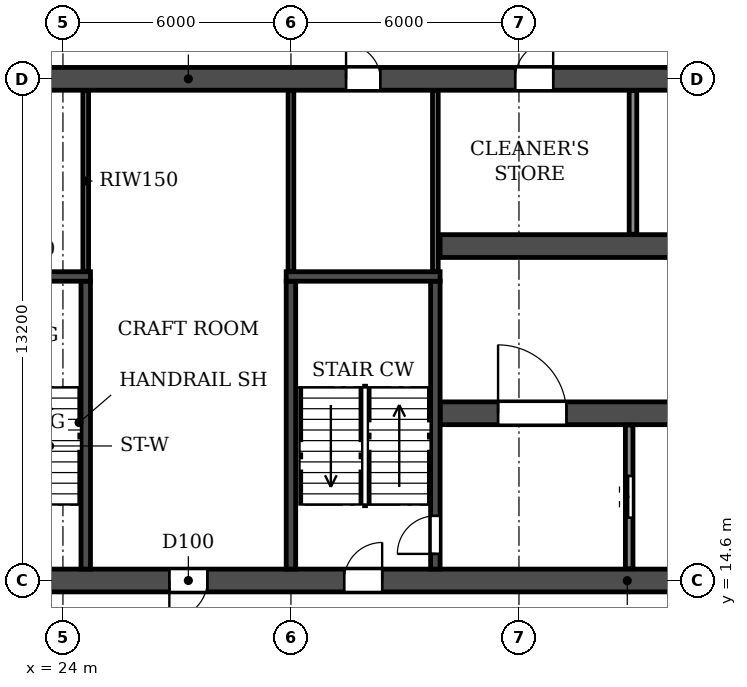
"""IFC4 building model, lengths in metres.
Left out: names, types, materials, properties, quantities, classifications, styles, units other than length and angle.
Written with IfcOpenShell. Run it as: python <this file> out.ifc"""

import sys

from ifc_helpers import new_model, si_unit, direction, frame, frame_2d, origin, place, context, subcontext, project, spatial, rectangle, extrude, element, fill, save


model = new_model("IFC4")
c1 = context("Model", 3, precision=1e-05, world=origin(), true_north=direction((0.0, 1.0)))
c2 = subcontext(c1, "Body", "Model", "MODEL_VIEW")
j1 = project(units=[si_unit("LENGTHUNIT", "METRE"), si_unit("PLANEANGLEUNIT", "RADIAN")], contexts=[c1])
p1 = place(None, origin())
s1 = spatial("IfcSite", under=j1, at=p1, CompositionType="ELEMENT")
p2 = place(p1, origin())
s2 = spatial("IfcBuilding", under=s1, at=p2, CompositionType="ELEMENT")
p3 = place(p2, frame((0.0, 0.0, 43.2)))
s3 = spatial("IfcBuildingStorey", under=s2, at=p3, CompositionType="ELEMENT", Elevation=43.2)
p4 = place(p3, frame((2.6, 14.6, 0.0), z_axis=(0.0, 0.0, 1.0), x_axis=(1.0, 0.0, 0.0)))
e1 = element("IfcWall", 1, at=p4, inside=s3, PredefinedType="SOLIDWALL", context=c2, shape_type="SweptSolid", body=[
    extrude(rectangle(XDim=96.8, YDim=0.6, at=frame_2d((48.4, 0.0))), origin(), (0.0, 0.0, 1.0), 3.05),
])
p5 = place(p4, frame((3.05, 0.0, 0.0)))
e2 = element("IfcOpeningElement", 2, at=p5, cuts=e1, PredefinedType="OPENING", context=c2, shape_type="SweptSolid", body=[
    extrude(rectangle(XDim=1.5, YDim=2.1, at=frame_2d((0.75, 1.05))), frame((0.0, 0.31, 0.0), z_axis=(0.0, -1.0, 0.0), x_axis=(1.0, 0.0, 0.0)), (0.0, 0.0, 1.0), 0.62),
])
p6 = place(p4, frame((10.75, 0.0, 0.0)))
e3 = element("IfcOpeningElement", 3, at=p6, cuts=e1, PredefinedType="OPENING", context=c2, shape_type="SweptSolid", body=[
    extrude(rectangle(XDim=1.5, YDim=2.1, at=frame_2d((0.75, 1.05))), frame((0.0, 0.31, 0.0), z_axis=(0.0, -1.0, 0.0), x_axis=(1.0, 0.0, 0.0)), (0.0, 0.0, 1.0), 0.62),
])
p7 = place(p4, frame((16.3, 0.0, 0.0)))
e4 = element("IfcOpeningElement", 4, at=p7, cuts=e1, PredefinedType="OPENING", context=c2, shape_type="SweptSolid", body=[
    extrude(rectangle(XDim=1.0, YDim=2.1, at=frame_2d((0.5, 1.05))), frame((0.0, 0.31, 0.0), z_axis=(0.0, -1.0, 0.0), x_axis=(1.0, 0.0, 0.0)), (0.0, 0.0, 1.0), 0.62),
])
p8 = place(p4, frame((24.2, 0.0, 0.0)))
e5 = element("IfcOpeningElement", 5, at=p8, cuts=e1, PredefinedType="OPENING", context=c2, shape_type="SweptSolid", body=[
    extrude(rectangle(XDim=1.0, YDim=2.1, at=frame_2d((0.5, 1.05))), frame((0.0, 0.31, 0.0), z_axis=(0.0, -1.0, 0.0), x_axis=(1.0, 0.0, 0.0)), (0.0, 0.0, 1.0), 0.62),
])
p9 = place(p4, frame((28.8, 0.0, 0.0)))
e6 = element("IfcOpeningElement", 6, at=p9, cuts=e1, PredefinedType="OPENING", context=c2, shape_type="SweptSolid", body=[
    extrude(rectangle(XDim=1.0, YDim=2.1, at=frame_2d((0.5, 1.05))), frame((0.0, 0.31, 0.0), z_axis=(0.0, -1.0, 0.0), x_axis=(1.0, 0.0, 0.0)), (0.0, 0.0, 1.0), 0.62),
])
p10 = place(p4, frame((42.7, 0.0, 0.0)))
e7 = element("IfcOpeningElement", 7, at=p10, cuts=e1, PredefinedType="OPENING", context=c2, shape_type="SweptSolid", body=[
    extrude(rectangle(XDim=1.0, YDim=2.1, at=frame_2d((0.5, 1.05))), frame((0.0, 0.31, 0.0), z_axis=(0.0, -1.0, 0.0), x_axis=(1.0, 0.0, 0.0)), (0.0, 0.0, 1.0), 0.62),
])
p11 = place(p4, frame((47.9, 0.0, 0.0)))
e8 = element("IfcOpeningElement", 8, at=p11, cuts=e1, PredefinedType="OPENING", context=c2, shape_type="SweptSolid", body=[
    extrude(rectangle(XDim=1.0, YDim=2.1, at=frame_2d((0.5, 1.05))), frame((0.0, 0.31, 0.0), z_axis=(0.0, -1.0, 0.0), x_axis=(1.0, 0.0, 0.0)), (0.0, 0.0, 1.0), 0.62),
])
p12 = place(p4, frame((51.8, 0.0, 0.0)))
e9 = element("IfcOpeningElement", 9, at=p12, cuts=e1, PredefinedType="OPENING", context=c2, shape_type="SweptSolid", body=[
    extrude(rectangle(XDim=1.0, YDim=2.1, at=frame_2d((0.5, 1.05))), frame((0.0, 0.31, 0.0), z_axis=(0.0, -1.0, 0.0), x_axis=(1.0, 0.0, 0.0)), (0.0, 0.0, 1.0), 0.62),
])
p13 = place(p4, frame((55.7, 0.0, 0.0)))
e10 = element("IfcOpeningElement", 10, at=p13, cuts=e1, PredefinedType="OPENING", context=c2, shape_type="SweptSolid", body=[
    extrude(rectangle(XDim=1.0, YDim=2.1, at=frame_2d((0.5, 1.05))), frame((0.0, 0.31, 0.0), z_axis=(0.0, -1.0, 0.0), x_axis=(1.0, 0.0, 0.0)), (0.0, 0.0, 1.0), 0.62),
])
p14 = place(p4, frame((67.0, 0.0, 0.0)))
e11 = element("IfcOpeningElement", 11, at=p14, cuts=e1, PredefinedType="OPENING", context=c2, shape_type="SweptSolid", body=[
    extrude(rectangle(XDim=1.0, YDim=2.1, at=frame_2d((0.5, 1.05))), frame((0.0, 0.31, 0.0), z_axis=(0.0, -1.0, 0.0), x_axis=(1.0, 0.0, 0.0)), (0.0, 0.0, 1.0), 0.62),
])
p15 = place(p4, frame((71.6, 0.0, 0.0)))
e12 = element("IfcOpeningElement", 12, at=p15, cuts=e1, PredefinedType="OPENING", context=c2, shape_type="SweptSolid", body=[
    extrude(rectangle(XDim=1.0, YDim=2.1, at=frame_2d((0.5, 1.05))), frame((0.0, 0.31, 0.0), z_axis=(0.0, -1.0, 0.0), x_axis=(1.0, 0.0, 0.0)), (0.0, 0.0, 1.0), 0.62),
])
p16 = place(p4, frame((79.5, 0.0, 0.0)))
e13 = element("IfcOpeningElement", 13, at=p16, cuts=e1, PredefinedType="OPENING", context=c2, shape_type="SweptSolid", body=[
    extrude(rectangle(XDim=1.0, YDim=2.1, at=frame_2d((0.5, 1.05))), frame((0.0, 0.31, 0.0), z_axis=(0.0, -1.0, 0.0), x_axis=(1.0, 0.0, 0.0)), (0.0, 0.0, 1.0), 0.62),
])
p17 = place(p4, frame((84.05, 0.0, 0.0)))
e14 = element("IfcOpeningElement", 14, at=p17, cuts=e1, PredefinedType="OPENING", context=c2, shape_type="SweptSolid", body=[
    extrude(rectangle(XDim=1.0, YDim=2.1, at=frame_2d((0.5, 1.05))), frame((0.0, 0.31, 0.0), z_axis=(0.0, -1.0, 0.0), x_axis=(1.0, 0.0, 0.0)), (0.0, 0.0, 1.0), 0.62),
])
p18 = place(p4, frame((91.75, 0.0, 0.0)))
e15 = element("IfcOpeningElement", 15, at=p18, cuts=e1, PredefinedType="OPENING", context=c2, shape_type="SweptSolid", body=[
    extrude(rectangle(XDim=1.0, YDim=2.1, at=frame_2d((0.5, 1.05))), frame((0.0, 0.31, 0.0), z_axis=(0.0, -1.0, 0.0), x_axis=(1.0, 0.0, 0.0)), (0.0, 0.0, 1.0), 0.62),
])
p19 = place(p3, frame((2.6, 27.8, 0.0), z_axis=(0.0, 0.0, 1.0), x_axis=(1.0, 0.0, 0.0)))
e16 = element("IfcWall", 16, at=p19, inside=s3, PredefinedType="SOLIDWALL", context=c2, shape_type="SweptSolid", body=[
    extrude(rectangle(XDim=96.8, YDim=0.6, at=frame_2d((48.4, 0.0))), origin(), (0.0, 0.0, 1.0), 3.05),
])
p20 = place(p19, frame((7.2, 0.0, 0.0)))
e17 = element("IfcOpeningElement", 17, at=p20, cuts=e16, PredefinedType="OPENING", context=c2, shape_type="SweptSolid", body=[
    extrude(rectangle(XDim=1.0, YDim=2.1, at=frame_2d((0.5, 1.05))), frame((0.0, 0.31, 0.0), z_axis=(0.0, -1.0, 0.0), x_axis=(1.0, 0.0, 0.0)), (0.0, 0.0, 1.0), 0.62),
])
p21 = place(p19, frame((16.3, 0.0, 0.0)))
e18 = element("IfcOpeningElement", 18, at=p21, cuts=e16, PredefinedType="OPENING", context=c2, shape_type="SweptSolid", body=[
    extrude(rectangle(XDim=1.0, YDim=2.1, at=frame_2d((0.5, 1.05))), frame((0.0, 0.31, 0.0), z_axis=(0.0, -1.0, 0.0), x_axis=(1.0, 0.0, 0.0)), (0.0, 0.0, 1.0), 0.62),
])
p22 = place(p19, frame((19.65, 0.0, 0.0)))
e19 = element("IfcOpeningElement", 19, at=p22, cuts=e16, PredefinedType="OPENING", context=c2, shape_type="SweptSolid", body=[
    extrude(rectangle(XDim=0.9, YDim=2.1, at=frame_2d((0.45, 1.05))), frame((0.0, 0.31, 0.0), z_axis=(0.0, -1.0, 0.0), x_axis=(1.0, 0.0, 0.0)), (0.0, 0.0, 1.0), 0.62),
])
p23 = place(p19, frame((28.85, 0.0, 0.0)))
e20 = element("IfcOpeningElement", 20, at=p23, cuts=e16, PredefinedType="OPENING", context=c2, shape_type="SweptSolid", body=[
    extrude(rectangle(XDim=0.9, YDim=2.1, at=frame_2d((0.45, 1.05))), frame((0.0, 0.31, 0.0), z_axis=(0.0, -1.0, 0.0), x_axis=(1.0, 0.0, 0.0)), (0.0, 0.0, 1.0), 0.62),
])
p24 = place(p19, frame((33.3, 0.0, 0.0)))
e21 = element("IfcOpeningElement", 21, at=p24, cuts=e16, PredefinedType="OPENING", context=c2, shape_type="SweptSolid", body=[
    extrude(rectangle(XDim=1.0, YDim=2.1, at=frame_2d((0.5, 1.05))), frame((0.0, 0.31, 0.0), z_axis=(0.0, -1.0, 0.0), x_axis=(1.0, 0.0, 0.0)), (0.0, 0.0, 1.0), 0.62),
])
p25 = place(p19, frame((38.25, 0.0, 0.0)))
e22 = element("IfcOpeningElement", 22, at=p25, cuts=e16, PredefinedType="OPENING", context=c2, shape_type="SweptSolid", body=[
    extrude(rectangle(XDim=1.5, YDim=2.1, at=frame_2d((0.75, 1.05))), frame((0.0, 0.31, 0.0), z_axis=(0.0, -1.0, 0.0), x_axis=(1.0, 0.0, 0.0)), (0.0, 0.0, 1.0), 0.62),
])
p26 = place(p19, frame((45.0, 0.0, 0.0)))
e23 = element("IfcOpeningElement", 23, at=p26, cuts=e16, PredefinedType="OPENING", context=c2, shape_type="SweptSolid", body=[
    extrude(rectangle(XDim=1.0, YDim=2.1, at=frame_2d((0.5, 1.05))), frame((0.0, 0.31, 0.0), z_axis=(0.0, -1.0, 0.0), x_axis=(1.0, 0.0, 0.0)), (0.0, 0.0, 1.0), 0.62),
])
p27 = place(p19, frame((47.9, 0.0, 0.0)))
e24 = element("IfcOpeningElement", 24, at=p27, cuts=e16, PredefinedType="OPENING", context=c2, shape_type="SweptSolid", body=[
    extrude(rectangle(XDim=1.0, YDim=2.1, at=frame_2d((0.5, 1.05))), frame((0.0, 0.31, 0.0), z_axis=(0.0, -1.0, 0.0), x_axis=(1.0, 0.0, 0.0)), (0.0, 0.0, 1.0), 0.62),
])
p28 = place(p19, frame((52.1, 0.0, 0.0)))
e25 = element("IfcOpeningElement", 25, at=p28, cuts=e16, PredefinedType="OPENING", context=c2, shape_type="SweptSolid", body=[
    extrude(rectangle(XDim=1.0, YDim=2.1, at=frame_2d((0.5, 1.05))), frame((0.0, 0.31, 0.0), z_axis=(0.0, -1.0, 0.0), x_axis=(1.0, 0.0, 0.0)), (0.0, 0.0, 1.0), 0.62),
])
p29 = place(p19, frame((56.0, 0.0, 0.0)))
e26 = element("IfcOpeningElement", 26, at=p29, cuts=e16, PredefinedType="OPENING", context=c2, shape_type="SweptSolid", body=[
    extrude(rectangle(XDim=1.0, YDim=2.1, at=frame_2d((0.5, 1.05))), frame((0.0, 0.31, 0.0), z_axis=(0.0, -1.0, 0.0), x_axis=(1.0, 0.0, 0.0)), (0.0, 0.0, 1.0), 0.62),
])
p30 = place(p19, frame((61.2, 0.0, 0.0)))
e27 = element("IfcOpeningElement", 27, at=p30, cuts=e16, PredefinedType="OPENING", context=c2, shape_type="SweptSolid", body=[
    extrude(rectangle(XDim=1.0, YDim=2.1, at=frame_2d((0.5, 1.05))), frame((0.0, 0.31, 0.0), z_axis=(0.0, -1.0, 0.0), x_axis=(1.0, 0.0, 0.0)), (0.0, 0.0, 1.0), 0.62),
])
p31 = place(p19, frame((67.05, 0.0, 0.0)))
e28 = element("IfcOpeningElement", 28, at=p31, cuts=e16, PredefinedType="OPENING", context=c2, shape_type="SweptSolid", body=[
    extrude(rectangle(XDim=0.9, YDim=2.1, at=frame_2d((0.45, 1.05))), frame((0.0, 0.31, 0.0), z_axis=(0.0, -1.0, 0.0), x_axis=(1.0, 0.0, 0.0)), (0.0, 0.0, 1.0), 0.62),
])
p32 = place(p19, frame((76.25, 0.0, 0.0)))
e29 = element("IfcOpeningElement", 29, at=p32, cuts=e16, PredefinedType="OPENING", context=c2, shape_type="SweptSolid", body=[
    extrude(rectangle(XDim=0.9, YDim=2.1, at=frame_2d((0.45, 1.05))), frame((0.0, 0.31, 0.0), z_axis=(0.0, -1.0, 0.0), x_axis=(1.0, 0.0, 0.0)), (0.0, 0.0, 1.0), 0.62),
])
p33 = place(p19, frame((79.5, 0.0, 0.0)))
e30 = element("IfcOpeningElement", 30, at=p33, cuts=e16, PredefinedType="OPENING", context=c2, shape_type="SweptSolid", body=[
    extrude(rectangle(XDim=1.0, YDim=2.1, at=frame_2d((0.5, 1.05))), frame((0.0, 0.31, 0.0), z_axis=(0.0, -1.0, 0.0), x_axis=(1.0, 0.0, 0.0)), (0.0, 0.0, 1.0), 0.62),
])
p34 = place(p19, frame((84.05, 0.0, 0.0)))
e31 = element("IfcOpeningElement", 31, at=p34, cuts=e16, PredefinedType="OPENING", context=c2, shape_type="SweptSolid", body=[
    extrude(rectangle(XDim=1.0, YDim=2.1, at=frame_2d((0.5, 1.05))), frame((0.0, 0.31, 0.0), z_axis=(0.0, -1.0, 0.0), x_axis=(1.0, 0.0, 0.0)), (0.0, 0.0, 1.0), 0.62),
])
p35 = place(p19, frame((91.75, 0.0, 0.0)))
e32 = element("IfcOpeningElement", 32, at=p35, cuts=e16, PredefinedType="OPENING", context=c2, shape_type="SweptSolid", body=[
    extrude(rectangle(XDim=1.0, YDim=2.1, at=frame_2d((0.5, 1.05))), frame((0.0, 0.31, 0.0), z_axis=(0.0, -1.0, 0.0), x_axis=(1.0, 0.0, 0.0)), (0.0, 0.0, 1.0), 0.62),
])
p36 = place(p3, frame((33.925, 19.0, 0.0), z_axis=(0.0, 0.0, 1.0), x_axis=(1.0, 0.0, 0.0)))
e33 = element("IfcWall", 33, at=p36, inside=s3, PredefinedType="SOLIDWALL", context=c2, shape_type="SweptSolid", body=[
    extrude(rectangle(XDim=34.15, YDim=0.6, at=frame_2d((17.075, 0.0))), origin(), (0.0, 0.0, 1.0), 3.05),
])
p37 = place(p36, frame((16.175, 0.0, 0.0)))
e34 = element("IfcOpeningElement", 34, at=p37, cuts=e33, PredefinedType="OPENING", context=c2, shape_type="SweptSolid", body=[
    extrude(rectangle(XDim=1.8, YDim=2.1, at=frame_2d((0.9, 1.05))), frame((0.0, 0.31, 0.0), z_axis=(0.0, -1.0, 0.0), x_axis=(1.0, 0.0, 0.0)), (0.0, 0.0, 1.0), 0.62),
])
p38 = place(p36, frame((1.525, 0.0, 0.0)))
e35 = element("IfcOpeningElement", 35, at=p38, cuts=e33, PredefinedType="OPENING", context=c2, shape_type="SweptSolid", body=[
    extrude(rectangle(XDim=1.8, YDim=2.1, at=frame_2d((0.9, 1.05))), frame((0.0, 0.31, 0.0), z_axis=(0.0, -1.0, 0.0), x_axis=(1.0, 0.0, 0.0)), (0.0, 0.0, 1.0), 0.62),
])
p39 = place(p36, frame((8.725, 0.0, 0.0)))
e36 = element("IfcOpeningElement", 36, at=p39, cuts=e33, PredefinedType="OPENING", context=c2, shape_type="SweptSolid", body=[
    extrude(rectangle(XDim=1.1, YDim=2.1, at=frame_2d((0.55, 1.05))), frame((0.0, 0.31, 0.0), z_axis=(0.0, -1.0, 0.0), x_axis=(1.0, 0.0, 0.0)), (0.0, 0.0, 1.0), 0.62),
])
p40 = place(p36, frame((11.325, 0.0, 0.0)))
e37 = element("IfcOpeningElement", 37, at=p40, cuts=e33, PredefinedType="OPENING", context=c2, shape_type="SweptSolid", body=[
    extrude(rectangle(XDim=1.1, YDim=2.1, at=frame_2d((0.55, 1.05))), frame((0.0, 0.31, 0.0), z_axis=(0.0, -1.0, 0.0), x_axis=(1.0, 0.0, 0.0)), (0.0, 0.0, 1.0), 0.62),
])
p41 = place(p36, frame((13.925, 0.0, 0.0)))
e38 = element("IfcOpeningElement", 38, at=p41, cuts=e33, PredefinedType="OPENING", context=c2, shape_type="SweptSolid", body=[
    extrude(rectangle(XDim=1.1, YDim=2.1, at=frame_2d((0.55, 1.05))), frame((0.0, 0.31, 0.0), z_axis=(0.0, -1.0, 0.0), x_axis=(1.0, 0.0, 0.0)), (0.0, 0.0, 1.0), 0.62),
])
p42 = place(p36, frame((19.125, 0.0, 0.0)))
e39 = element("IfcOpeningElement", 39, at=p42, cuts=e33, PredefinedType="OPENING", context=c2, shape_type="SweptSolid", body=[
    extrude(rectangle(XDim=1.1, YDim=2.1, at=frame_2d((0.55, 1.05))), frame((0.0, 0.31, 0.0), z_axis=(0.0, -1.0, 0.0), x_axis=(1.0, 0.0, 0.0)), (0.0, 0.0, 1.0), 0.62),
])
p43 = place(p36, frame((21.725, 0.0, 0.0)))
e40 = element("IfcOpeningElement", 40, at=p43, cuts=e33, PredefinedType="OPENING", context=c2, shape_type="SweptSolid", body=[
    extrude(rectangle(XDim=1.1, YDim=2.1, at=frame_2d((0.55, 1.05))), frame((0.0, 0.31, 0.0), z_axis=(0.0, -1.0, 0.0), x_axis=(1.0, 0.0, 0.0)), (0.0, 0.0, 1.0), 0.62),
])
p44 = place(p36, frame((24.325, 0.0, 0.0)))
e41 = element("IfcOpeningElement", 41, at=p44, cuts=e33, PredefinedType="OPENING", context=c2, shape_type="SweptSolid", body=[
    extrude(rectangle(XDim=1.1, YDim=2.1, at=frame_2d((0.55, 1.05))), frame((0.0, 0.31, 0.0), z_axis=(0.0, -1.0, 0.0), x_axis=(1.0, 0.0, 0.0)), (0.0, 0.0, 1.0), 0.62),
])
p45 = place(p36, frame((30.825, 0.0, 0.0)))
e42 = element("IfcOpeningElement", 42, at=p45, cuts=e33, PredefinedType="OPENING", context=c2, shape_type="SweptSolid", body=[
    extrude(rectangle(XDim=1.8, YDim=2.1, at=frame_2d((0.9, 1.05))), frame((0.0, 0.31, 0.0), z_axis=(0.0, -1.0, 0.0), x_axis=(1.0, 0.0, 0.0)), (0.0, 0.0, 1.0), 0.62),
])
p46 = place(p3, frame((33.925, 23.4, 0.0), z_axis=(0.0, 0.0, 1.0), x_axis=(1.0, 0.0, 0.0)))
e43 = element("IfcWall", 43, at=p46, inside=s3, PredefinedType="SOLIDWALL", context=c2, shape_type="SweptSolid", body=[
    extrude(rectangle(XDim=34.15, YDim=0.6, at=frame_2d((17.075, 0.0))), origin(), (0.0, 0.0, 1.0), 3.05),
])
p47 = place(p46, frame((16.175, 0.0, 0.0)))
e44 = element("IfcOpeningElement", 44, at=p47, cuts=e43, PredefinedType="OPENING", context=c2, shape_type="SweptSolid", body=[
    extrude(rectangle(XDim=1.8, YDim=2.1, at=frame_2d((0.9, 1.05))), frame((0.0, 0.31, 0.0), z_axis=(0.0, -1.0, 0.0), x_axis=(1.0, 0.0, 0.0)), (0.0, 0.0, 1.0), 0.62),
])
p48 = place(p46, frame((11.025, 0.0, 0.0)))
e45 = element("IfcOpeningElement", 45, at=p48, cuts=e43, PredefinedType="OPENING", context=c2, shape_type="SweptSolid", body=[
    extrude(rectangle(XDim=1.1, YDim=2.1, at=frame_2d((0.55, 1.05))), frame((0.0, 0.31, 0.0), z_axis=(0.0, -1.0, 0.0), x_axis=(1.0, 0.0, 0.0)), (0.0, 0.0, 1.0), 0.62),
])
p49 = place(p3, frame((30.0, 14.9, 0.0), z_axis=(0.0, 0.0, 1.0), x_axis=(0.0, 1.0, 0.0)))
e46 = element("IfcWall", 46, at=p49, inside=s3, PredefinedType="SOLIDWALL", context=c2, shape_type="SweptSolid", body=[
    extrude(rectangle(XDim=7.575, YDim=0.25, at=frame_2d((3.788, 0.0))), origin(), (0.0, 0.0, 1.0), 3.05),
])
p50 = place(p3, frame((33.8, 14.9, 0.0), z_axis=(0.0, 0.0, 1.0), x_axis=(0.0, 1.0, 0.0)))
e47 = element("IfcWall", 47, at=p50, inside=s3, PredefinedType="SOLIDWALL", context=c2, shape_type="SweptSolid", body=[
    extrude(rectangle(XDim=7.575, YDim=0.25, at=frame_2d((3.788, 0.0))), origin(), (0.0, 0.0, 1.0), 3.05),
])
p51 = place(p50, frame((0.4, 0.0, 0.0)))
e48 = element("IfcOpeningElement", 48, at=p51, cuts=e47, PredefinedType="OPENING", context=c2, shape_type="SweptSolid", body=[
    extrude(rectangle(XDim=1.0, YDim=2.1, at=frame_2d((0.5, 1.05))), frame((0.0, 0.135, 0.0), z_axis=(0.0, -1.0, 0.0), x_axis=(1.0, 0.0, 0.0)), (0.0, 0.0, 1.0), 0.27),
])
p52 = place(p3, frame((29.875, 22.6, 0.0), z_axis=(0.0, 0.0, 1.0), x_axis=(1.0, 0.0, 0.0)))
e49 = element("IfcWall", 49, at=p52, inside=s3, PredefinedType="SOLIDWALL", context=c2, shape_type="SweptSolid", body=[
    extrude(rectangle(XDim=4.05, YDim=0.25, at=frame_2d((2.025, 0.0))), origin(), (0.0, 0.0, 1.0), 3.05),
])
p53 = place(p3, frame((24.6, 14.9, 0.0), z_axis=(0.0, 0.0, 1.0), x_axis=(0.0, 1.0, 0.0)))
e50 = element("IfcWall", 50, at=p53, inside=s3, PredefinedType="SOLIDWALL", context=c2, shape_type="SweptSolid", body=[
    extrude(rectangle(XDim=7.575, YDim=0.25, at=frame_2d((3.788, 0.0))), origin(), (0.0, 0.0, 1.0), 3.05),
])
p54 = place(p3, frame((20.675, 22.6, 0.0), z_axis=(0.0, 0.0, 1.0), x_axis=(1.0, 0.0, 0.0)))
e51 = element("IfcWall", 51, at=p54, inside=s3, PredefinedType="SOLIDWALL", context=c2, shape_type="SweptSolid", body=[
    extrude(rectangle(XDim=4.05, YDim=0.25, at=frame_2d((2.025, 0.0))), origin(), (0.0, 0.0, 1.0), 3.05),
])
p55 = place(p3, frame((39.0, 23.71, 0.0), z_axis=(0.0, 0.0, 1.0), x_axis=(0.0, 1.0, 0.0)))
e52 = element("IfcWall", 52, at=p55, inside=s3, PredefinedType="PARTITIONING", context=c2, shape_type="SweptSolid", body=[
    extrude(rectangle(XDim=3.78, YDim=0.2, at=frame_2d((1.89, 0.0))), origin(), (0.0, 0.0, 1.0), 3.05),
])
for number, where, z_axis, x_axis in (
    (53, (24.6, 22.735, 0.0), (0.0, 0.0, 1.0), (0.0, 1.0, 0.0)),
    (54, (30.0, 22.735, 0.0), (0.0, 0.0, 1.0), (0.0, 1.0, 0.0)),
    (55, (33.8, 22.735, 0.0), (0.0, 0.0, 1.0), (0.0, 1.0, 0.0)),
):
    element("IfcWall", number, at=place(p3, frame(where, z_axis=z_axis, x_axis=x_axis)), inside=s3, PredefinedType="PARTITIONING", context=c2, shape_type="SweptSolid", body=[
        extrude(rectangle(XDim=4.755, YDim=0.15, at=frame_2d((2.377, 0.0))), origin(), (0.0, 0.0, 1.0), 3.05),
    ])
p56 = place(p3, frame((38.9, 14.91, 0.0), z_axis=(0.0, 0.0, 1.0), x_axis=(0.0, 1.0, 0.0)))
e56 = element("IfcWall", 56, at=p56, inside=s3, PredefinedType="PARTITIONING", context=c2, shape_type="SweptSolid", body=[
    extrude(rectangle(XDim=3.78, YDim=0.2, at=frame_2d((1.89, 0.0))), origin(), (0.0, 0.0, 1.0), 3.05),
])
p57 = place(p56, frame((1.34, 0.0, 0.0)))
e57 = element("IfcOpeningElement", 57, at=p57, cuts=e56, PredefinedType="OPENING", context=c2, shape_type="SweptSolid", body=[
    extrude(rectangle(XDim=1.1, YDim=2.1, at=frame_2d((0.55, 1.05))), frame((0.0, 0.11, 0.0), z_axis=(0.0, -1.0, 0.0), x_axis=(1.0, 0.0, 0.0)), (0.0, 0.0, 1.0), 0.22),
])
p58 = place(p23, origin())
e58 = element("IfcDoor", 58, at=p58, inside=s3, OperationType="SINGLE_SWING_LEFT", PredefinedType="DOOR", context=c2, shape_type="SweptSolid", body=[
    extrude(rectangle(XDim=0.9, YDim=2.1, at=frame_2d((0.45, 1.05))), frame((0.0, 0.025, 0.0), z_axis=(0.0, -1.0, 0.0), x_axis=(1.0, 0.0, 0.0)), (0.0, 0.0, 1.0), 0.05),
])
fill(e20, e58)
p59 = place(p24, origin())
e59 = element("IfcDoor", 59, at=p59, inside=s3, OperationType="SINGLE_SWING_RIGHT", PredefinedType="DOOR", context=c2, shape_type="SweptSolid", body=[
    extrude(rectangle(XDim=1.0, YDim=2.1, at=frame_2d((0.5, 1.05))), frame((0.0, 0.025, 0.0), z_axis=(0.0, -1.0, 0.0), x_axis=(1.0, 0.0, 0.0)), (0.0, 0.0, 1.0), 0.05),
])
fill(e21, e59)
p60 = place(p8, frame((1.0, 0.0, 0.0), z_axis=(0.0, 0.0, 1.0), x_axis=(-1.0, 0.0, 0.0)))
e60 = element("IfcDoor", 60, at=p60, inside=s3, OperationType="SINGLE_SWING_RIGHT", PredefinedType="DOOR", context=c2, shape_type="SweptSolid", body=[
    extrude(rectangle(XDim=1.0, YDim=2.1, at=frame_2d((0.5, 1.05))), frame((0.0, 0.025, 0.0), z_axis=(0.0, -1.0, 0.0), x_axis=(1.0, 0.0, 0.0)), (0.0, 0.0, 1.0), 0.05),
])
fill(e5, e60)
p61 = place(p9, origin())
e61 = element("IfcDoor", 61, at=p61, inside=s3, OperationType="SINGLE_SWING_RIGHT", PredefinedType="DOOR", context=c2, shape_type="SweptSolid", body=[
    extrude(rectangle(XDim=1.0, YDim=2.1, at=frame_2d((0.5, 1.05))), frame((0.0, 0.025, 0.0), z_axis=(0.0, -1.0, 0.0), x_axis=(1.0, 0.0, 0.0)), (0.0, 0.0, 1.0), 0.05),
])
fill(e6, e61)
p62 = place(p51, origin())
e62 = element("IfcDoor", 62, at=p62, inside=s3, OperationType="SINGLE_SWING_LEFT", PredefinedType="DOOR", context=c2, shape_type="SweptSolid", body=[
    extrude(rectangle(XDim=1.0, YDim=2.1, at=frame_2d((0.5, 1.05))), frame((0.0, 0.025, 0.0), z_axis=(0.0, -1.0, 0.0), x_axis=(1.0, 0.0, 0.0)), (0.0, 0.0, 1.0), 0.05),
])
fill(e48, e62)
p63 = place(p57, origin())
e63 = element("IfcDoor", 63, at=p63, inside=s3, OperationType="DOUBLE_DOOR_SLIDING", PredefinedType="DOOR", context=c2, shape_type="SweptSolid", body=[
    extrude(rectangle(XDim=1.1, YDim=2.1, at=frame_2d((0.55, 1.05))), frame((0.0, 0.025, 0.0), z_axis=(0.0, -1.0, 0.0), x_axis=(1.0, 0.0, 0.0)), (0.0, 0.0, 1.0), 0.05),
])
fill(e57, e63)
p64 = place(p38, origin())
e64 = element("IfcDoor", 64, at=p64, inside=s3, OperationType="DOUBLE_DOOR_SINGLE_SWING", PredefinedType="DOOR", context=c2, shape_type="SweptSolid", body=[
    extrude(rectangle(XDim=1.8, YDim=2.1, at=frame_2d((0.9, 1.05))), frame((0.0, 0.025, 0.0), z_axis=(0.0, -1.0, 0.0), x_axis=(1.0, 0.0, 0.0)), (0.0, 0.0, 1.0), 0.05),
])
fill(e35, e64)
save(model, sys.argv[1])
